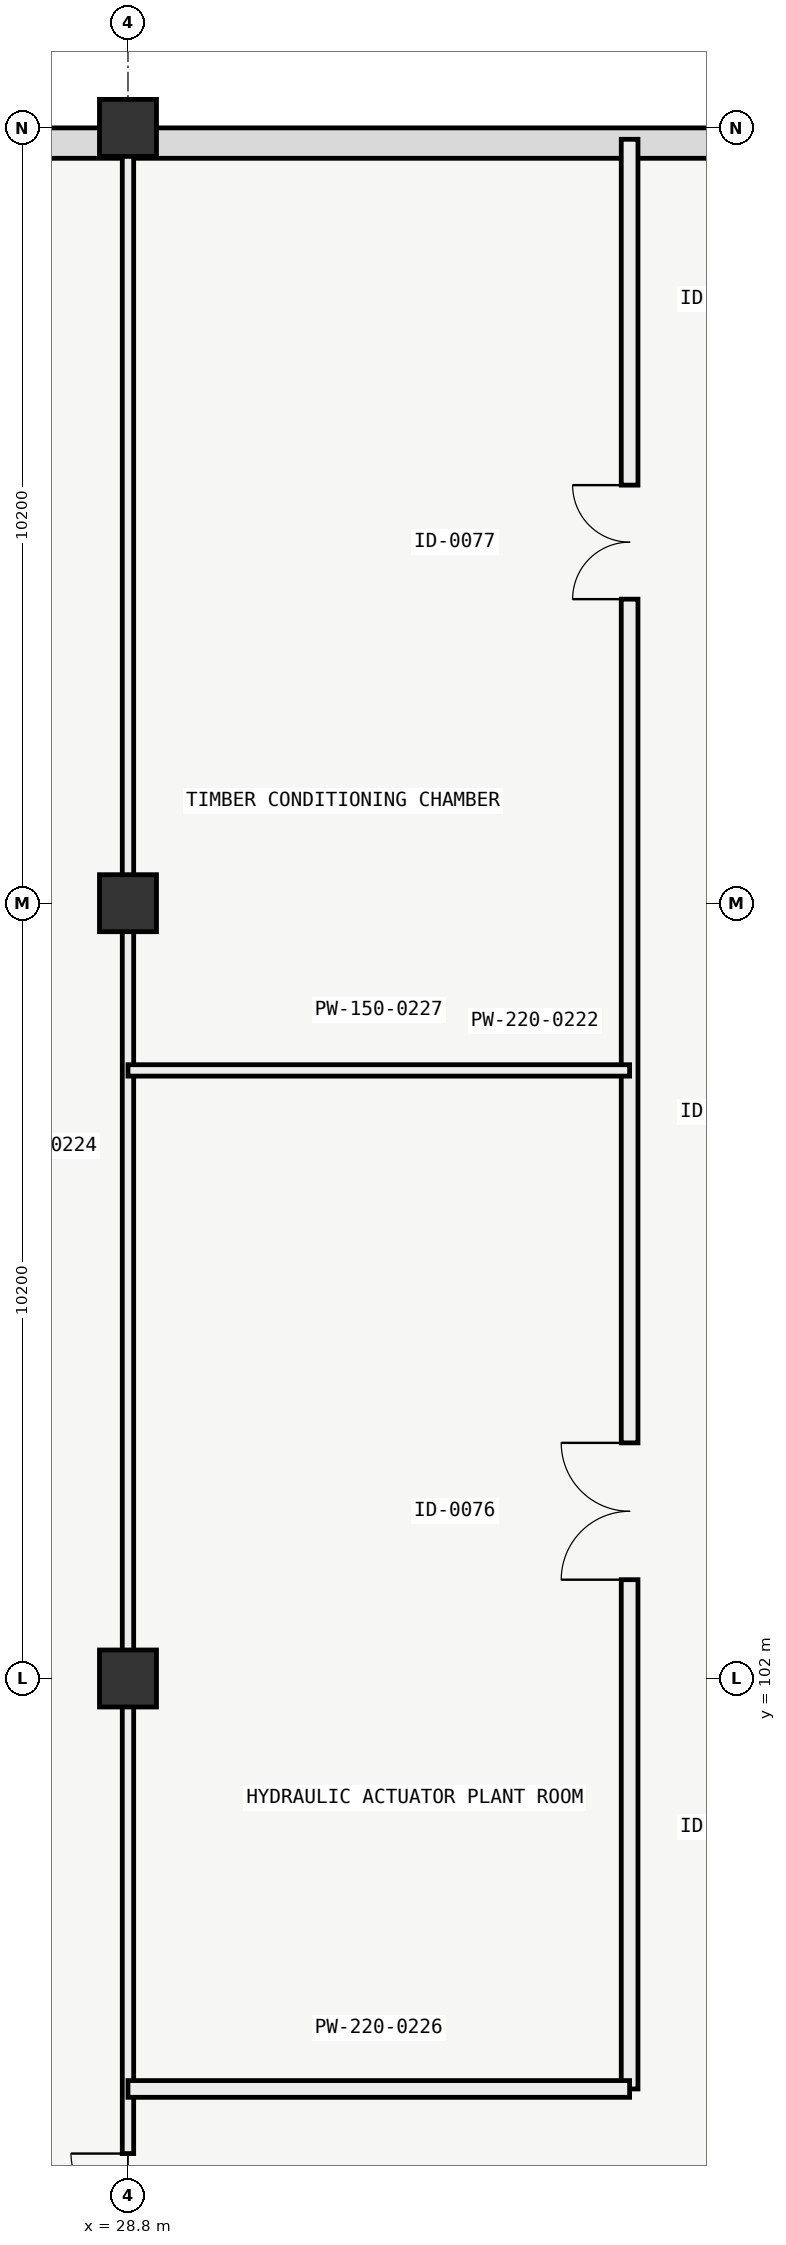
"""IFC4 building model, lengths in metres.
Left out: names, types, materials, properties, quantities, classifications, styles, units other than length and angle.
Written with IfcOpenShell. Run it as: python <this file> out.ifc"""

import sys

from ifc_helpers import new_model, si_unit, direction, frame, frame_2d, origin, origin_2d, place, context, subcontext, project, spatial, rectangle, extrude, element, fill, save


model = new_model("IFC4")
c1 = context("Model", 3, precision=1e-05, world=origin(), true_north=direction((0.0, 1.0)))
c2 = subcontext(c1, "Body", "Model", "MODEL_VIEW")
j1 = project(units=[si_unit("LENGTHUNIT", "METRE"), si_unit("PLANEANGLEUNIT", "RADIAN")], contexts=[c1])
p1 = place(None, origin())
s1 = spatial("IfcSite", under=j1, at=p1, CompositionType="ELEMENT")
p2 = place(p1, origin())
s2 = spatial("IfcBuilding", under=s1, at=p2, CompositionType="ELEMENT")
p3 = place(p2, frame((0.0, 0.0, -4.2)))
s3 = spatial("IfcBuildingStorey", under=s2, at=p3, CompositionType="ELEMENT", Elevation=-4.2)
for number, where, z_axis, x_axis in (
    (1, (28.8, 102.0, 0.0), (0.0, 0.0, 1.0), (1.0, 0.0, 0.0)),
    (2, (28.8, 112.2, 0.0), (0.0, 0.0, 1.0), (1.0, 0.0, 0.0)),
    (3, (28.8, 122.4, 0.0), (0.0, 0.0, 1.0), (1.0, 0.0, 0.0)),
):
    element("IfcColumn", number, at=place(p3, frame(where, z_axis=z_axis, x_axis=x_axis)), inside=s3, PredefinedType="COLUMN", context=c2, shape_type="SweptSolid", body=[
        extrude(rectangle(XDim=0.75, YDim=0.75, at=origin_2d()), origin(), (0.0, 0.0, 1.0), 4.2),
    ])
p4 = place(p3, frame((0.2, 122.2, 0.0), z_axis=(0.0, 0.0, 1.0), x_axis=(1.0, 0.0, 0.0)))
e4 = element("IfcWall", 4, at=p4, inside=s3, PredefinedType="USERDEFINED", context=c2, shape_type="SweptSolid", body=[
    extrude(rectangle(XDim=47.6, YDim=0.4, at=frame_2d((23.8, 0.0))), origin(), (0.0, 0.0, 1.0), 3.9),
])
p5 = place(p3, frame((35.4, 96.6, 0.0), z_axis=(0.0, 0.0, 1.0), x_axis=(0.0, 1.0, 0.0)))
e5 = element("IfcWall", 5, at=p5, inside=s3, PredefinedType="PARTITIONING", context=c2, shape_type="SweptSolid", body=[
    extrude(rectangle(XDim=25.65, YDim=0.22, at=frame_2d((12.825, 0.0))), origin(), (0.0, 0.0, 1.0), 3.268),
])
p6 = place(p5, frame((6.7, 0.0, 0.0)))
e6 = element("IfcOpeningElement", 6, at=p6, cuts=e5, PredefinedType="OPENING", context=c2, shape_type="SweptSolid", body=[
    extrude(rectangle(XDim=1.8, YDim=2.2, at=frame_2d((0.9, 1.1))), frame((0.0, 0.12, 0.0), z_axis=(0.0, -1.0, 0.0), x_axis=(1.0, 0.0, 0.0)), (0.0, 0.0, 1.0), 0.24),
])
p7 = place(p5, frame((19.6, 0.0, 0.0)))
e7 = element("IfcOpeningElement", 7, at=p7, cuts=e5, PredefinedType="OPENING", context=c2, shape_type="SweptSolid", body=[
    extrude(rectangle(XDim=1.5, YDim=2.2, at=frame_2d((0.75, 1.1))), frame((0.0, 0.12, 0.0), z_axis=(0.0, -1.0, 0.0), x_axis=(1.0, 0.0, 0.0)), (0.0, 0.0, 1.0), 0.24),
])
p8 = place(p3, frame((28.8, 71.4, 0.0), z_axis=(0.0, 0.0, 1.0), x_axis=(0.0, 1.0, 0.0)))
e8 = element("IfcWall", 8, at=p8, inside=s3, PredefinedType="PARTITIONING", context=c2, shape_type="SweptSolid", body=[
    extrude(rectangle(XDim=50.85, YDim=0.15, at=frame_2d((25.425, 0.0))), origin(), (0.0, 0.0, 1.0), 3.03),
])
p9 = place(p8, frame((22.85, 0.0, 0.0)))
e9 = element("IfcOpeningElement", 9, at=p9, cuts=e8, PredefinedType="OPENING", context=c2, shape_type="SweptSolid", body=[
    extrude(rectangle(XDim=1.5, YDim=2.2, at=frame_2d((0.75, 1.1))), frame((0.0, 0.085, 0.0), z_axis=(0.0, -1.0, 0.0), x_axis=(1.0, 0.0, 0.0)), (0.0, 0.0, 1.0), 0.17),
])
p10 = place(p3, frame((28.8, 96.6, 0.0), z_axis=(0.0, 0.0, 1.0), x_axis=(1.0, 0.0, 0.0)))
e10 = element("IfcWall", 10, at=p10, inside=s3, PredefinedType="PARTITIONING", context=c2, shape_type="SweptSolid", body=[
    extrude(rectangle(XDim=6.6, YDim=0.22, at=frame_2d((3.3, 0.0))), origin(), (0.0, 0.0, 1.0), 3.423),
])
p11 = place(p3, frame((28.8, 110.0, 0.0), z_axis=(0.0, 0.0, 1.0), x_axis=(1.0, 0.0, 0.0)))
e11 = element("IfcWall", 11, at=p11, inside=s3, PredefinedType="PARTITIONING", context=c2, shape_type="SweptSolid", body=[
    extrude(rectangle(XDim=6.6, YDim=0.15, at=frame_2d((3.3, 0.0))), origin(), (0.0, 0.0, 1.0), 3.423),
])
p12 = place(p6, origin())
e12 = element("IfcDoor", 12, at=p12, inside=s3, OperationType="DOUBLE_DOOR_SINGLE_SWING", PredefinedType="DOOR", context=c2, shape_type="SweptSolid", body=[
    extrude(rectangle(XDim=1.8, YDim=2.2, at=frame_2d((0.9, 1.1))), frame((0.0, 0.025, 0.0), z_axis=(0.0, -1.0, 0.0), x_axis=(1.0, 0.0, 0.0)), (0.0, 0.0, 1.0), 0.05),
])
fill(e6, e12)
p13 = place(p7, origin())
e13 = element("IfcDoor", 13, at=p13, inside=s3, OperationType="DOUBLE_DOOR_SINGLE_SWING", PredefinedType="DOOR", context=c2, shape_type="SweptSolid", body=[
    extrude(rectangle(XDim=1.5, YDim=2.2, at=frame_2d((0.75, 1.1))), frame((0.0, 0.025, 0.0), z_axis=(0.0, -1.0, 0.0), x_axis=(1.0, 0.0, 0.0)), (0.0, 0.0, 1.0), 0.05),
])
fill(e7, e13)
p14 = place(p9, origin())
e14 = element("IfcDoor", 14, at=p14, inside=s3, OperationType="DOUBLE_DOOR_SINGLE_SWING", PredefinedType="DOOR", context=c2, shape_type="SweptSolid", body=[
    extrude(rectangle(XDim=1.5, YDim=2.2, at=frame_2d((0.75, 1.1))), frame((0.0, 0.025, 0.0), z_axis=(0.0, -1.0, 0.0), x_axis=(1.0, 0.0, 0.0)), (0.0, 0.0, 1.0), 0.05),
])
fill(e9, e14)
save(model, sys.argv[1])
